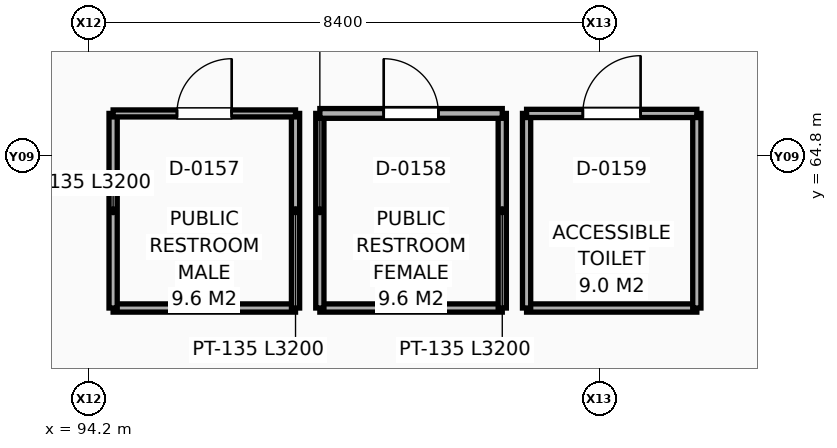
"""IFC4 building model, lengths in metres.
Left out: names, types, materials, properties, quantities, classifications, styles, units other than length and angle.
Written with IfcOpenShell. Run it as: python <this file> out.ifc"""

import sys

from ifc_helpers import new_model, si_unit, direction, frame, frame_2d, origin, place, context, subcontext, project, spatial, rectangle, extrude, element, fill, save


model = new_model("IFC4")
c1 = context("Model", 3, precision=1e-05, world=origin(), true_north=direction((0.0, 1.0)))
c2 = subcontext(c1, "Body", "Model", "MODEL_VIEW")
j1 = project(units=[si_unit("LENGTHUNIT", "METRE"), si_unit("PLANEANGLEUNIT", "RADIAN")], contexts=[c1])
p1 = place(None, origin())
s1 = spatial("IfcSite", under=j1, at=p1, CompositionType="ELEMENT")
p2 = place(p1, origin())
s2 = spatial("IfcBuilding", under=s1, at=p2, CompositionType="ELEMENT")
p3 = place(p2, origin())
s3 = spatial("IfcBuildingStorey", under=s2, at=p3, CompositionType="ELEMENT", Elevation=0.0)
p4 = place(p3, frame((94.6, 62.3, 0.0), z_axis=(0.0, 0.0, 1.0), x_axis=(1.0, 0.0, 0.0)))
e1 = element("IfcWall", 1, at=p4, inside=s3, PredefinedType="PARTITIONING", context=c2, shape_type="SweptSolid", body=[
    extrude(rectangle(XDim=3.0, YDim=0.135, at=frame_2d((1.5, 0.0))), origin(), (0.0, 0.0, 1.0), 5.06),
])
for number, where, z_axis, x_axis in (
    (2, (97.6, 62.3, 0.0), (0.0, 0.0, 1.0), (0.0, 1.0, 0.0)),
    (3, (94.6, 62.3, 0.0), (0.0, 0.0, 1.0), (0.0, 1.0, 0.0)),
):
    element("IfcWall", number, at=place(p3, frame(where, z_axis=z_axis, x_axis=x_axis)), inside=s3, PredefinedType="PARTITIONING", context=c2, shape_type="SweptSolid", body=[
        extrude(rectangle(XDim=3.2, YDim=0.135, at=frame_2d((1.6, 0.0))), origin(), (0.0, 0.0, 1.0), 5.06),
    ])
p5 = place(p3, frame((94.6, 65.5, 0.0), z_axis=(0.0, 0.0, 1.0), x_axis=(1.0, 0.0, 0.0)))
e4 = element("IfcWall", 4, at=p5, inside=s3, PredefinedType="PARTITIONING", context=c2, shape_type="SweptSolid", body=[
    extrude(rectangle(XDim=3.0, YDim=0.115, at=frame_2d((1.5, 0.0))), origin(), (0.0, 0.0, 1.0), 5.06),
])
p6 = place(p5, frame((1.05, 0.0, 0.0)))
e5 = element("IfcOpeningElement", 5, at=p6, cuts=e4, PredefinedType="OPENING", context=c2, shape_type="SweptSolid", body=[
    extrude(rectangle(XDim=0.9, YDim=2.1, at=frame_2d((0.45, 1.05))), frame((0.0, 0.067, 0.0), z_axis=(0.0, -1.0, 0.0), x_axis=(1.0, 0.0, 0.0)), (0.0, 0.0, 1.0), 0.135),
])
p7 = place(p3, frame((98.0, 62.3, 0.0), z_axis=(0.0, 0.0, 1.0), x_axis=(1.0, 0.0, 0.0)))
e6 = element("IfcWall", 6, at=p7, inside=s3, PredefinedType="PARTITIONING", context=c2, shape_type="SweptSolid", body=[
    extrude(rectangle(XDim=3.0, YDim=0.135, at=frame_2d((1.5, 0.0))), origin(), (0.0, 0.0, 1.0), 5.06),
])
for number, where, z_axis, x_axis in (
    (7, (101.0, 62.3, 0.0), (0.0, 0.0, 1.0), (0.0, 1.0, 0.0)),
    (8, (98.0, 62.3, 0.0), (0.0, 0.0, 1.0), (0.0, 1.0, 0.0)),
):
    element("IfcWall", number, at=place(p3, frame(where, z_axis=z_axis, x_axis=x_axis)), inside=s3, PredefinedType="PARTITIONING", context=c2, shape_type="SweptSolid", body=[
        extrude(rectangle(XDim=3.2, YDim=0.135, at=frame_2d((1.6, 0.0))), origin(), (0.0, 0.0, 1.0), 5.06),
    ])
p8 = place(p3, frame((98.0, 65.5, 0.0), z_axis=(0.0, 0.0, 1.0), x_axis=(1.0, 0.0, 0.0)))
e9 = element("IfcWall", 9, at=p8, inside=s3, PredefinedType="PARTITIONING", context=c2, shape_type="SweptSolid", body=[
    extrude(rectangle(XDim=3.0, YDim=0.16, at=frame_2d((1.5, 0.0))), origin(), (0.0, 0.0, 1.0), 5.06),
])
p9 = place(p8, frame((1.05, 0.0, 0.0)))
e10 = element("IfcOpeningElement", 10, at=p9, cuts=e9, PredefinedType="OPENING", context=c2, shape_type="SweptSolid", body=[
    extrude(rectangle(XDim=0.9, YDim=2.1, at=frame_2d((0.45, 1.05))), frame((0.0, 0.09, 0.0), z_axis=(0.0, -1.0, 0.0), x_axis=(1.0, 0.0, 0.0)), (0.0, 0.0, 1.0), 0.18),
])
p10 = place(p3, frame((101.4, 62.3, 0.0), z_axis=(0.0, 0.0, 1.0), x_axis=(1.0, 0.0, 0.0)))
e11 = element("IfcWall", 11, at=p10, inside=s3, PredefinedType="PARTITIONING", context=c2, shape_type="SweptSolid", body=[
    extrude(rectangle(XDim=2.8, YDim=0.135, at=frame_2d((1.4, 0.0))), origin(), (0.0, 0.0, 1.0), 5.06),
])
for number, where, z_axis, x_axis in (
    (12, (104.2, 62.3, 0.0), (0.0, 0.0, 1.0), (0.0, 1.0, 0.0)),
    (13, (101.4, 62.3, 0.0), (0.0, 0.0, 1.0), (0.0, 1.0, 0.0)),
):
    element("IfcWall", number, at=place(p3, frame(where, z_axis=z_axis, x_axis=x_axis)), inside=s3, PredefinedType="PARTITIONING", context=c2, shape_type="SweptSolid", body=[
        extrude(rectangle(XDim=3.2, YDim=0.135, at=frame_2d((1.6, 0.0))), origin(), (0.0, 0.0, 1.0), 5.06),
    ])
p11 = place(p3, frame((101.4, 65.5, 0.0), z_axis=(0.0, 0.0, 1.0), x_axis=(1.0, 0.0, 0.0)))
e14 = element("IfcWall", 14, at=p11, inside=s3, PredefinedType="PARTITIONING", context=c2, shape_type="SweptSolid", body=[
    extrude(rectangle(XDim=2.8, YDim=0.135, at=frame_2d((1.4, 0.0))), origin(), (0.0, 0.0, 1.0), 4.864),
])
p12 = place(p11, frame((0.925, 0.0, 0.0)))
e15 = element("IfcOpeningElement", 15, at=p12, cuts=e14, PredefinedType="OPENING", context=c2, shape_type="SweptSolid", body=[
    extrude(rectangle(XDim=0.95, YDim=2.1, at=frame_2d((0.475, 1.05))), frame((0.0, 0.077, 0.0), z_axis=(0.0, -1.0, 0.0), x_axis=(1.0, 0.0, 0.0)), (0.0, 0.0, 1.0), 0.155),
])
p13 = place(p6, origin())
e16 = element("IfcDoor", 16, at=p13, inside=s3, OperationType="SINGLE_SWING_RIGHT", PredefinedType="DOOR", context=c2, shape_type="SweptSolid", body=[
    extrude(rectangle(XDim=0.9, YDim=2.1, at=frame_2d((0.45, 1.05))), frame((0.0, 0.025, 0.0), z_axis=(0.0, -1.0, 0.0), x_axis=(1.0, 0.0, 0.0)), (0.0, 0.0, 1.0), 0.05),
])
fill(e5, e16)
p14 = place(p9, origin())
e17 = element("IfcDoor", 17, at=p14, inside=s3, OperationType="SINGLE_SWING_LEFT", PredefinedType="DOOR", context=c2, shape_type="SweptSolid", body=[
    extrude(rectangle(XDim=0.9, YDim=2.1, at=frame_2d((0.45, 1.05))), frame((0.0, 0.025, 0.0), z_axis=(0.0, -1.0, 0.0), x_axis=(1.0, 0.0, 0.0)), (0.0, 0.0, 1.0), 0.05),
])
fill(e10, e17)
p15 = place(p12, origin())
e18 = element("IfcDoor", 18, at=p15, inside=s3, OperationType="SINGLE_SWING_RIGHT", PredefinedType="DOOR", context=c2, shape_type="SweptSolid", body=[
    extrude(rectangle(XDim=0.95, YDim=2.1, at=frame_2d((0.475, 1.05))), frame((0.0, 0.025, 0.0), z_axis=(0.0, -1.0, 0.0), x_axis=(1.0, 0.0, 0.0)), (0.0, 0.0, 1.0), 0.05),
])
fill(e15, e18)
save(model, sys.argv[1])
